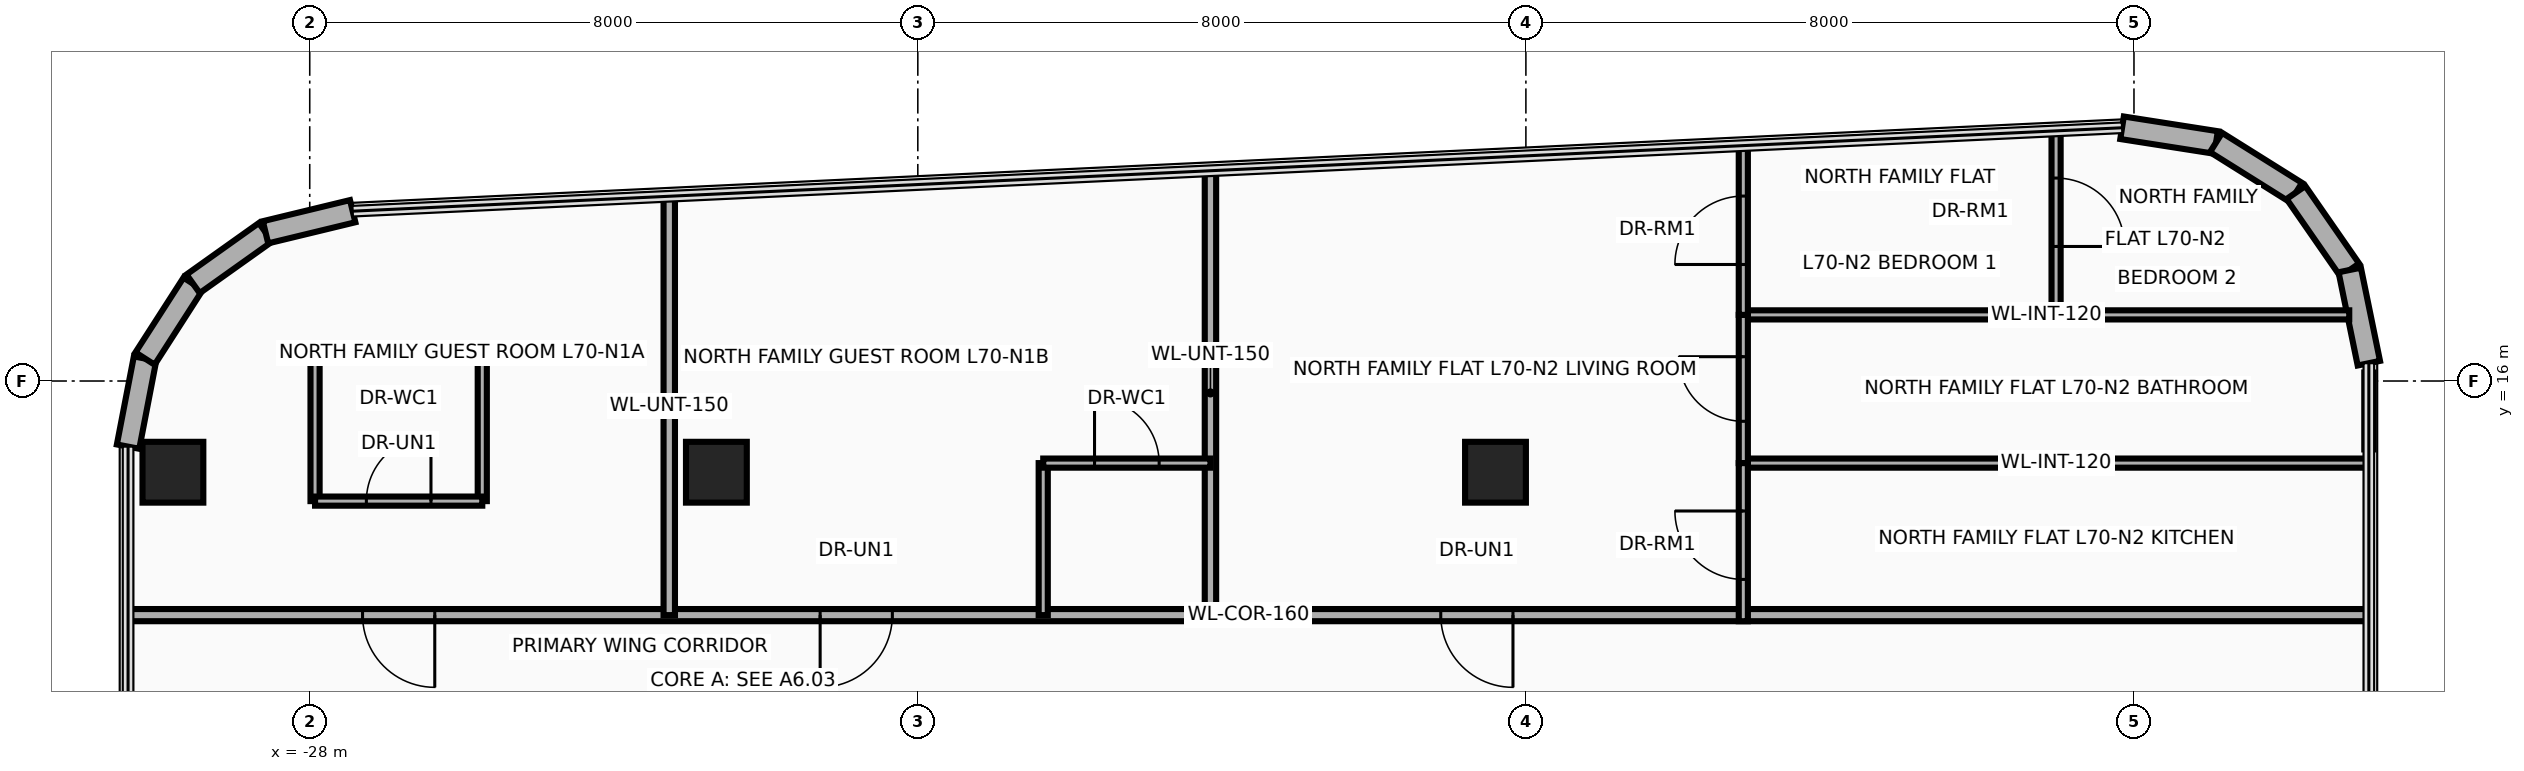
"""IFC4 building model, lengths in metres.
Left out: names, types, materials, properties, quantities, classifications, styles, units other than length and angle.
Written with IfcOpenShell. Run it as: python <this file> out.ifc"""

import sys

from ifc_helpers import new_model, si_unit, direction, frame, frame_2d, origin, origin_2d, place, context, subcontext, project, spatial, rectangle, extrude, source, transform, mapped, element, fill, save


model = new_model("IFC4")
c1 = context("Model", 3, precision=1e-05, world=origin(), true_north=direction((0.0, 1.0)))
c2 = subcontext(c1, "Body", "Model", "MODEL_VIEW")
j1 = project(units=[si_unit("LENGTHUNIT", "METRE"), si_unit("PLANEANGLEUNIT", "RADIAN")], contexts=[c1])
p1 = place(None, origin())
s1 = spatial("IfcSite", under=j1, at=p1, CompositionType="ELEMENT")
p2 = place(p1, origin())
s2 = spatial("IfcBuilding", under=s1, at=p2, CompositionType="ELEMENT")
p3 = place(p2, frame((0.0, 0.0, 269.5)))
s3 = spatial("IfcBuildingStorey", under=s2, at=p3, CompositionType="ELEMENT", Elevation=269.5)
m1 = source(origin(), c2, "Body", "SweptSolid", [
    extrude(rectangle(XDim=0.8, YDim=0.8, at=origin_2d()), origin(), (0.0, 0.0, 1.0), 3.5),
])
for number, where, z_axis, x_axis in (
    (1, (-29.8, 14.8, 0.0), (0.0, 0.0, 1.0), (1.0, 0.0, 0.0)),
    (2, (-22.65, 14.8, 0.0), (0.0, 0.0, 1.0), (1.0, 0.0, 0.0)),
    (3, (-12.4, 14.8, 0.0), (0.0, 0.0, 1.0), (1.0, 0.0, 0.0)),
):
    element("IfcColumn", number, at=place(p3, frame(where, z_axis=z_axis, x_axis=x_axis)), inside=s3, PredefinedType="COLUMN", context=c2, shape_type="MappedRepresentation", body=[
        mapped(m1, transform((0.0, 0.0, 0.0), x_axis=(1.0, 0.0, 0.0), y_axis=(0.0, 1.0, 0.0), z_axis=(0.0, 0.0, 1.0), scale=1.0)),
    ])
p4 = place(p3, frame((-30.39, 15.137, 0.0), z_axis=(0.0, 0.0, 1.0), x_axis=(0.189307792679, 0.981917796779, 0.0)))
e4 = element("IfcWall", 4, at=p4, inside=s3, PredefinedType="SOLIDWALL", context=c2, shape_type="SweptSolid", body=[
    extrude(rectangle(XDim=1.18, YDim=0.3, at=frame_2d((0.59, 0.0))), origin(), (0.0, 0.0, 1.0), 3.26),
])
p5 = place(p3, frame((-30.167, 16.295, 0.0), z_axis=(0.0, 0.0, 1.0), x_axis=(0.540842020947, 0.841124193195, 0.0)))
e5 = element("IfcWall", 5, at=p5, inside=s3, PredefinedType="SOLIDWALL", context=c2, shape_type="SweptSolid", body=[
    extrude(rectangle(XDim=1.169, YDim=0.3, at=frame_2d((0.584, 0.0))), origin(), (0.0, 0.0, 1.0), 3.26),
])
p6 = place(p3, frame((-29.534, 17.279, 0.0), z_axis=(0.0, 0.0, 1.0), x_axis=(0.81466371606, 0.579933642527, 0.0)))
e6 = element("IfcWall", 6, at=p6, inside=s3, PredefinedType="SOLIDWALL", context=c2, shape_type="SweptSolid", body=[
    extrude(rectangle(XDim=1.169, YDim=0.3, at=frame_2d((0.584, 0.0))), origin(), (0.0, 0.0, 1.0), 3.26),
])
p7 = place(p3, frame((-28.582, 17.957, 0.0), z_axis=(0.0, 0.0, 1.0), x_axis=(0.971929016595, 0.235274279725, 0.0)))
e7 = element("IfcWall", 7, at=p7, inside=s3, PredefinedType="SOLIDWALL", context=c2, shape_type="SweptSolid", body=[
    extrude(rectangle(XDim=1.18, YDim=0.3, at=frame_2d((0.59, 0.0))), origin(), (0.0, 0.0, 1.0), 3.26),
])
p8 = place(p3, frame((-4.157, 19.332, 0.0), z_axis=(0.0, 0.0, 1.0), x_axis=(0.987969236552, -0.15465053387, 0.0)))
e8 = element("IfcWall", 8, at=p8, inside=s3, PredefinedType="SOLIDWALL", context=c2, shape_type="SweptSolid", body=[
    extrude(rectangle(XDim=1.252, YDim=0.3, at=frame_2d((0.626, 0.0))), origin(), (0.0, 0.0, 1.0), 3.26),
])
for number, where, z_axis, x_axis in (
    (9, (-2.92, 19.138, 0.0), (0.0, 0.0, 1.0), (0.847, -0.531, 0.0)),
    (10, (-1.869, 18.48, 0.0), (0.0, 0.0, 1.0), (0.57, -0.822, 0.0)),
):
    element("IfcWall", number, at=place(p3, frame(where, z_axis=z_axis, x_axis=x_axis)), inside=s3, PredefinedType="SOLIDWALL", context=c2, shape_type="SweptSolid", body=[
        extrude(rectangle(XDim=1.24, YDim=0.3, at=frame_2d((0.62, 0.0))), origin(), (0.0, 0.0, 1.0), 3.26),
    ])
p9 = place(p3, frame((-1.161, 17.461, 0.0), z_axis=(0.0, 0.0, 1.0), x_axis=(0.20087696073, -0.979616479367, 0.0)))
e11 = element("IfcWall", 11, at=p9, inside=s3, PredefinedType="SOLIDWALL", context=c2, shape_type="SweptSolid", body=[
    extrude(rectangle(XDim=1.252, YDim=0.3, at=frame_2d((0.626, 0.0))), origin(), (0.0, 0.0, 1.0), 3.26),
])
p10 = place(p3, frame((-30.39, 12.92, 0.0), z_axis=(0.0, 0.0, 1.0), x_axis=(1.0, 0.0, 0.0)))
e12 = element("IfcWall", 12, at=p10, inside=s3, PredefinedType="PARTITIONING", context=c2, shape_type="SweptSolid", body=[
    extrude(rectangle(XDim=29.48, YDim=0.16, at=frame_2d((14.74, 0.0))), origin(), (0.0, 0.0, 1.0), 2.634),
])
p11 = place(p10, frame((3.085, 0.0, 0.0)))
e13 = element("IfcOpeningElement", 13, at=p11, cuts=e12, PredefinedType="OPENING", context=c2, shape_type="SweptSolid", body=[
    extrude(rectangle(XDim=0.95, YDim=2.15, at=frame_2d((0.475, 1.075))), frame((0.0, 0.095, 0.0), z_axis=(0.0, -1.0, 0.0), x_axis=(1.0, 0.0, 0.0)), (0.0, 0.0, 1.0), 0.19),
])
p12 = place(p10, frame((9.105, 0.0, 0.0)))
e14 = element("IfcOpeningElement", 14, at=p12, cuts=e12, PredefinedType="OPENING", context=c2, shape_type="SweptSolid", body=[
    extrude(rectangle(XDim=0.95, YDim=2.15, at=frame_2d((0.475, 1.075))), frame((0.0, 0.095, 0.0), z_axis=(0.0, -1.0, 0.0), x_axis=(1.0, 0.0, 0.0)), (0.0, 0.0, 1.0), 0.19),
])
p13 = place(p10, frame((17.27, 0.0, 0.0)))
e15 = element("IfcOpeningElement", 15, at=p13, cuts=e12, PredefinedType="OPENING", context=c2, shape_type="SweptSolid", body=[
    extrude(rectangle(XDim=0.95, YDim=2.15, at=frame_2d((0.475, 1.075))), frame((0.0, 0.095, 0.0), z_axis=(0.0, -1.0, 0.0), x_axis=(1.0, 0.0, 0.0)), (0.0, 0.0, 1.0), 0.19),
])
p14 = place(p3, frame((-16.15, 12.92, 0.0), z_axis=(0.0, 0.0, 1.0), x_axis=(0.0, 1.0, 0.0)))
e16 = element("IfcWall", 16, at=p14, inside=s3, PredefinedType="PARTITIONING", context=c2, shape_type="SweptSolid", body=[
    extrude(rectangle(XDim=5.846, YDim=0.15, at=frame_2d((2.923, 0.0))), origin(), (0.0, 0.0, 1.0), 2.623),
])
p15 = place(p3, frame((-23.27, 12.92, 0.0), z_axis=(0.0, 0.0, 1.0), x_axis=(0.0, 1.0, 0.0)))
e17 = element("IfcWall", 17, at=p15, inside=s3, PredefinedType="PARTITIONING", context=c2, shape_type="SweptSolid", body=[
    extrude(rectangle(XDim=5.511, YDim=0.15, at=frame_2d((2.755, 0.0))), origin(), (0.0, 0.0, 1.0), 2.623),
])
for number, where, z_axis, x_axis in (
    (18, (-27.93, 14.42, 0.0), (0.0, 0.0, 1.0), (0.0, 1.0, 0.0)),
    (19, (-25.73, 14.42, 0.0), (0.0, 0.0, 1.0), (0.0, 1.0, 0.0)),
):
    element("IfcWall", number, at=place(p3, frame(where, z_axis=z_axis, x_axis=x_axis)), inside=s3, PredefinedType="PARTITIONING", context=c2, shape_type="SweptSolid", body=[
        extrude(rectangle(XDim=1.984, YDim=0.12, at=frame_2d((0.992, 0.0))), origin(), (0.0, 0.0, 1.0), 2.623),
    ])
p16 = place(p3, frame((-27.93, 16.404, 0.0), z_axis=(0.0, 0.0, 1.0), x_axis=(1.0, 0.0, 0.0)))
e20 = element("IfcWall", 20, at=p16, inside=s3, PredefinedType="PARTITIONING", context=c2, shape_type="SweptSolid", body=[
    extrude(rectangle(XDim=2.2, YDim=0.12, at=frame_2d((1.1, 0.0))), origin(), (0.0, 0.0, 1.0), 3.26),
])
p17 = place(p3, frame((-27.93, 14.42, 0.0), z_axis=(0.0, 0.0, 1.0), x_axis=(1.0, 0.0, 0.0)))
e21 = element("IfcWall", 21, at=p17, inside=s3, PredefinedType="PARTITIONING", context=c2, shape_type="SweptSolid", body=[
    extrude(rectangle(XDim=2.2, YDim=0.12, at=frame_2d((1.1, 0.0))), origin(), (0.0, 0.0, 1.0), 3.26),
])
p18 = place(p17, frame((0.675, 0.0, 0.0)))
e22 = element("IfcOpeningElement", 22, at=p18, cuts=e21, PredefinedType="OPENING", context=c2, shape_type="SweptSolid", body=[
    extrude(rectangle(XDim=0.85, YDim=2.1, at=frame_2d((0.425, 1.05))), frame((0.0, 0.075, 0.0), z_axis=(0.0, -1.0, 0.0), x_axis=(1.0, 0.0, 0.0)), (0.0, 0.0, 1.0), 0.15),
])
p19 = place(p3, frame((-18.35, 12.92, 0.0), z_axis=(0.0, 0.0, 1.0), x_axis=(0.0, 1.0, 0.0)))
e23 = element("IfcWall", 23, at=p19, inside=s3, PredefinedType="PARTITIONING", context=c2, shape_type="SweptSolid", body=[
    extrude(rectangle(XDim=2.0, YDim=0.12, at=frame_2d((1.0, 0.0))), origin(), (0.0, 0.0, 1.0), 2.623),
])
p20 = place(p3, frame((-18.35, 14.92, 0.0), z_axis=(0.0, 0.0, 1.0), x_axis=(1.0, 0.0, 0.0)))
e24 = element("IfcWall", 24, at=p20, inside=s3, PredefinedType="PARTITIONING", context=c2, shape_type="SweptSolid", body=[
    extrude(rectangle(XDim=2.2, YDim=0.12, at=frame_2d((1.1, 0.0))), origin(), (0.0, 0.0, 1.0), 2.623),
])
p21 = place(p20, frame((0.675, 0.0, 0.0)))
e25 = element("IfcOpeningElement", 25, at=p21, cuts=e24, PredefinedType="OPENING", context=c2, shape_type="SweptSolid", body=[
    extrude(rectangle(XDim=0.85, YDim=2.1, at=frame_2d((0.425, 1.05))), frame((0.0, 0.075, 0.0), z_axis=(0.0, -1.0, 0.0), x_axis=(1.0, 0.0, 0.0)), (0.0, 0.0, 1.0), 0.15),
])
p22 = place(p3, frame((-9.14, 14.92, 0.0), z_axis=(0.0, 0.0, 1.0), x_axis=(1.0, 0.0, 0.0)))
e26 = element("IfcWall", 26, at=p22, inside=s3, PredefinedType="PARTITIONING", context=c2, shape_type="SweptSolid", body=[
    extrude(rectangle(XDim=8.23, YDim=0.12, at=frame_2d((4.115, 0.0))), origin(), (0.0, 0.0, 1.0), 3.26),
])
p23 = place(p3, frame((-9.14, 16.87, 0.0), z_axis=(0.0, 0.0, 1.0), x_axis=(1.0, 0.0, 0.0)))
e27 = element("IfcWall", 27, at=p23, inside=s3, PredefinedType="PARTITIONING", context=c2, shape_type="SweptSolid", body=[
    extrude(rectangle(XDim=7.972, YDim=0.12, at=frame_2d((3.986, 0.0))), origin(), (0.0, 0.0, 1.0), 3.26),
])
p24 = place(p3, frame((-9.14, 14.92, 0.0), z_axis=(0.0, 0.0, 1.0), x_axis=(0.0, 1.0, 0.0)))
e28 = element("IfcWall", 28, at=p24, inside=s3, PredefinedType="PARTITIONING", context=c2, shape_type="SweptSolid", body=[
    extrude(rectangle(XDim=1.95, YDim=0.12, at=frame_2d((0.975, 0.0))), origin(), (0.0, 0.0, 1.0), 3.26),
])
p25 = place(p24, frame((0.55, 0.0, 0.0)))
e29 = element("IfcOpeningElement", 29, at=p25, cuts=e28, PredefinedType="OPENING", context=c2, shape_type="SweptSolid", body=[
    extrude(rectangle(XDim=0.85, YDim=2.1, at=frame_2d((0.425, 1.05))), frame((0.0, 0.075, 0.0), z_axis=(0.0, -1.0, 0.0), x_axis=(1.0, 0.0, 0.0)), (0.0, 0.0, 1.0), 0.15),
])
p26 = place(p3, frame((-9.14, 12.84, 0.0), z_axis=(0.0, 0.0, 1.0), x_axis=(0.0, 1.0, 0.0)))
e30 = element("IfcWall", 30, at=p26, inside=s3, PredefinedType="PARTITIONING", context=c2, shape_type="SweptSolid", body=[
    extrude(rectangle(XDim=2.08, YDim=0.12, at=frame_2d((1.04, 0.0))), origin(), (0.0, 0.0, 1.0), 3.26),
])
p27 = place(p26, frame((0.55, 0.0, 0.0)))
e31 = element("IfcOpeningElement", 31, at=p27, cuts=e30, PredefinedType="OPENING", context=c2, shape_type="SweptSolid", body=[
    extrude(rectangle(XDim=0.9, YDim=2.1, at=frame_2d((0.45, 1.05))), frame((0.0, 0.075, 0.0), z_axis=(0.0, -1.0, 0.0), x_axis=(1.0, 0.0, 0.0)), (0.0, 0.0, 1.0), 0.15),
])
p28 = place(p3, frame((-9.14, 16.87, 0.0), z_axis=(0.0, 0.0, 1.0), x_axis=(0.0, 1.0, 0.0)))
e32 = element("IfcWall", 32, at=p28, inside=s3, PredefinedType="PARTITIONING", context=c2, shape_type="SweptSolid", body=[
    extrude(rectangle(XDim=2.227, YDim=0.12, at=frame_2d((1.113, 0.0))), origin(), (0.0, 0.0, 1.0), 3.26),
])
p29 = place(p28, frame((0.663, 0.0, 0.0)))
e33 = element("IfcOpeningElement", 33, at=p29, cuts=e32, PredefinedType="OPENING", context=c2, shape_type="SweptSolid", body=[
    extrude(rectangle(XDim=0.9, YDim=2.1, at=frame_2d((0.45, 1.05))), frame((0.0, 0.075, 0.0), z_axis=(0.0, -1.0, 0.0), x_axis=(1.0, 0.0, 0.0)), (0.0, 0.0, 1.0), 0.15),
])
p30 = place(p3, frame((-5.025, 16.87, 0.0), z_axis=(0.0, 0.0, 1.0), x_axis=(0.0, 1.0, 0.0)))
e34 = element("IfcWall", 34, at=p30, inside=s3, PredefinedType="PARTITIONING", context=c2, shape_type="SweptSolid", body=[
    extrude(rectangle(XDim=2.421, YDim=0.12, at=frame_2d((1.21, 0.0))), origin(), (0.0, 0.0, 1.0), 3.26),
])
p31 = place(p30, frame((0.9, 0.0, 0.0)))
e35 = element("IfcOpeningElement", 35, at=p31, cuts=e34, PredefinedType="OPENING", context=c2, shape_type="SweptSolid", body=[
    extrude(rectangle(XDim=0.9, YDim=2.1, at=frame_2d((0.45, 1.05))), frame((0.0, 0.075, 0.0), z_axis=(0.0, -1.0, 0.0), x_axis=(1.0, 0.0, 0.0)), (0.0, 0.0, 1.0), 0.15),
])
p32 = place(p3, frame((-0.91, 15.1, 0.0), z_axis=(0.0, 0.0, 1.0), x_axis=(0.0, 1.0, 0.0)))
e36 = element("IfcWall", 36, at=p32, inside=s3, PredefinedType="PARTITIONING", context=c2, shape_type="SweptSolid", body=[
    extrude(rectangle(XDim=1.012, YDim=0.12, at=frame_2d((0.506, 0.0))), origin(), (0.0, 0.0, 1.0), 3.26),
])
p33 = place(p11, frame((0.95, 0.0, 0.0), z_axis=(0.0, 0.0, 1.0), x_axis=(-1.0, 0.0, 0.0)))
e37 = element("IfcDoor", 37, at=p33, inside=s3, OperationType="SINGLE_SWING_LEFT", PredefinedType="DOOR", context=c2, shape_type="SweptSolid", body=[
    extrude(rectangle(XDim=0.95, YDim=2.15, at=frame_2d((0.475, 1.075))), frame((0.0, 0.025, 0.0), z_axis=(0.0, -1.0, 0.0), x_axis=(1.0, 0.0, 0.0)), (0.0, 0.0, 1.0), 0.05),
])
fill(e13, e37)
p34 = place(p18, origin())
e38 = element("IfcDoor", 38, at=p34, inside=s3, OperationType="SINGLE_SWING_RIGHT", PredefinedType="DOOR", context=c2, shape_type="SweptSolid", body=[
    extrude(rectangle(XDim=0.85, YDim=2.1, at=frame_2d((0.425, 1.05))), frame((0.0, 0.025, 0.0), z_axis=(0.0, -1.0, 0.0), x_axis=(1.0, 0.0, 0.0)), (0.0, 0.0, 1.0), 0.05),
])
fill(e22, e38)
p35 = place(p12, frame((0.95, 0.0, 0.0), z_axis=(0.0, 0.0, 1.0), x_axis=(-1.0, 0.0, 0.0)))
e39 = element("IfcDoor", 39, at=p35, inside=s3, OperationType="SINGLE_SWING_LEFT", PredefinedType="DOOR", context=c2, shape_type="SweptSolid", body=[
    extrude(rectangle(XDim=0.95, YDim=2.15, at=frame_2d((0.475, 1.075))), frame((0.0, 0.025, 0.0), z_axis=(0.0, -1.0, 0.0), x_axis=(1.0, 0.0, 0.0)), (0.0, 0.0, 1.0), 0.05),
])
fill(e14, e39)
p36 = place(p21, origin())
e40 = element("IfcDoor", 40, at=p36, inside=s3, OperationType="SINGLE_SWING_RIGHT", PredefinedType="DOOR", context=c2, shape_type="SweptSolid", body=[
    extrude(rectangle(XDim=0.85, YDim=2.1, at=frame_2d((0.425, 1.05))), frame((0.0, 0.025, 0.0), z_axis=(0.0, -1.0, 0.0), x_axis=(1.0, 0.0, 0.0)), (0.0, 0.0, 1.0), 0.05),
])
fill(e25, e40)
p37 = place(p13, frame((0.95, 0.0, 0.0), z_axis=(0.0, 0.0, 1.0), x_axis=(-1.0, 0.0, 0.0)))
e41 = element("IfcDoor", 41, at=p37, inside=s3, OperationType="SINGLE_SWING_LEFT", PredefinedType="DOOR", context=c2, shape_type="SweptSolid", body=[
    extrude(rectangle(XDim=0.95, YDim=2.15, at=frame_2d((0.475, 1.075))), frame((0.0, 0.025, 0.0), z_axis=(0.0, -1.0, 0.0), x_axis=(1.0, 0.0, 0.0)), (0.0, 0.0, 1.0), 0.05),
])
fill(e15, e41)
p38 = place(p25, origin())
e42 = element("IfcDoor", 42, at=p38, inside=s3, OperationType="SINGLE_SWING_RIGHT", PredefinedType="DOOR", context=c2, shape_type="SweptSolid", body=[
    extrude(rectangle(XDim=0.85, YDim=2.1, at=frame_2d((0.425, 1.05))), frame((0.0, 0.025, 0.0), z_axis=(0.0, -1.0, 0.0), x_axis=(1.0, 0.0, 0.0)), (0.0, 0.0, 1.0), 0.05),
])
fill(e29, e42)
p39 = place(p27, origin())
e43 = element("IfcDoor", 43, at=p39, inside=s3, OperationType="SINGLE_SWING_LEFT", PredefinedType="DOOR", context=c2, shape_type="SweptSolid", body=[
    extrude(rectangle(XDim=0.9, YDim=2.1, at=frame_2d((0.45, 1.05))), frame((0.0, 0.025, 0.0), z_axis=(0.0, -1.0, 0.0), x_axis=(1.0, 0.0, 0.0)), (0.0, 0.0, 1.0), 0.05),
])
fill(e31, e43)
p40 = place(p29, origin())
e44 = element("IfcDoor", 44, at=p40, inside=s3, OperationType="SINGLE_SWING_RIGHT", PredefinedType="DOOR", context=c2, shape_type="SweptSolid", body=[
    extrude(rectangle(XDim=0.9, YDim=2.1, at=frame_2d((0.45, 1.05))), frame((0.0, 0.025, 0.0), z_axis=(0.0, -1.0, 0.0), x_axis=(1.0, 0.0, 0.0)), (0.0, 0.0, 1.0), 0.05),
])
fill(e33, e44)
p41 = place(p31, frame((0.9, 0.0, 0.0), z_axis=(0.0, 0.0, 1.0), x_axis=(-1.0, 0.0, 0.0)))
e45 = element("IfcDoor", 45, at=p41, inside=s3, OperationType="SINGLE_SWING_LEFT", PredefinedType="DOOR", context=c2, shape_type="SweptSolid", body=[
    extrude(rectangle(XDim=0.9, YDim=2.1, at=frame_2d((0.45, 1.05))), frame((0.0, 0.025, 0.0), z_axis=(0.0, -1.0, 0.0), x_axis=(1.0, 0.0, 0.0)), (0.0, 0.0, 1.0), 0.05),
])
fill(e35, e45)
save(model, sys.argv[1])
